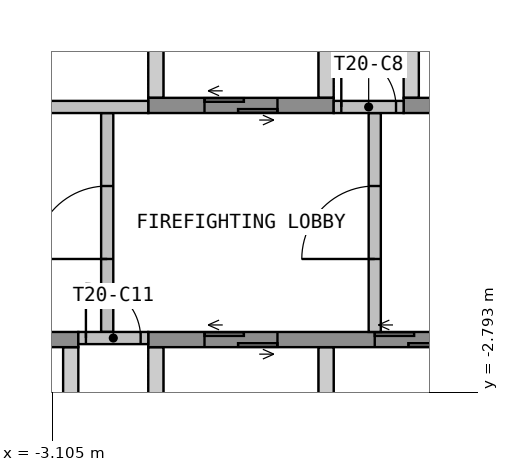
"""IFC4 building model, lengths in metres.
Left out: names, types, materials, properties, quantities, classifications, styles, units other than length and angle.
Written with IfcOpenShell. Run it as: python <this file> out.ifc"""

import sys

from ifc_helpers import new_model, si_unit, direction, frame, frame_2d, origin, place, context, subcontext, project, spatial, polyline, rectangle, outline, extrude, element, fill, save


model = new_model("IFC4")
c1 = context("Model", 3, precision=1e-05, world=origin(), true_north=direction((0.0, 1.0)))
c2 = subcontext(c1, "Body", "Model", "MODEL_VIEW")
j1 = project(units=[si_unit("LENGTHUNIT", "METRE"), si_unit("PLANEANGLEUNIT", "RADIAN")], contexts=[c1])
p1 = place(None, origin())
s1 = spatial("IfcSite", under=j1, at=p1, CompositionType="ELEMENT")
p2 = place(p1, origin())
s2 = spatial("IfcBuilding", under=s1, at=p2, CompositionType="ELEMENT")
p3 = place(p2, frame((0.0, 0.0, 270.3)))
s3 = spatial("IfcBuildingStorey", under=s2, at=p3, CompositionType="ELEMENT", Elevation=270.3)
p4 = place(p3, origin())
e1 = element("IfcWall", 1, at=p4, inside=s3, PredefinedType="SHEAR", context=c2, shape_type="SweptSolid", body=[
    extrude(outline(polyline([(-1.525, 2.05), (-1.275, 2.05), (-1.275, 4.75), (-1.525, 4.75), (-1.525, 2.05)])), origin(), (0.0, 0.0, 1.0), 3.575),
])
p5 = place(p3, origin())
e2 = element("IfcWall", 2, at=p5, inside=s3, PredefinedType="SHEAR", context=c2, shape_type="SweptSolid", body=[
    extrude(outline(polyline([(1.275, 2.05), (1.525, 2.05), (1.525, 4.75), (1.275, 4.75), (1.275, 2.05)])), origin(), (0.0, 0.0, 1.0), 3.575),
])
p6 = place(p3, origin())
e3 = element("IfcWall", 3, at=p6, inside=s3, PredefinedType="SHEAR", context=c2, shape_type="SweptSolid", body=[
    extrude(outline(polyline([(2.675, 2.05), (2.925, 2.05), (2.925, 4.75), (2.675, 4.75), (2.675, 2.05)])), origin(), (0.0, 0.0, 1.0), 3.575),
])
p7 = place(p3, frame((-1.525, 1.925, 0.0), z_axis=(0.0, 0.0, 1.0), x_axis=(1.0, 0.0, 0.0)))
e4 = element("IfcWall", 4, at=p7, inside=s3, PredefinedType="SHEAR", context=c2, shape_type="SweptSolid", body=[
    extrude(rectangle(XDim=3.05, YDim=0.25, at=frame_2d((1.525, 0.0))), origin(), (0.0, 0.0, 1.0), 3.575),
])
p8 = place(p7, frame((0.925, 0.0, 0.0)))
e5 = element("IfcOpeningElement", 5, at=p8, cuts=e4, PredefinedType="OPENING", context=c2, shape_type="SweptSolid", body=[
    extrude(rectangle(XDim=1.2, YDim=2.1, at=frame_2d((0.6, 1.05))), frame((0.0, 0.135, 0.0), z_axis=(0.0, -1.0, 0.0), x_axis=(1.0, 0.0, 0.0)), (0.0, 0.0, 1.0), 0.27),
])
p9 = place(p3, frame((2.675, 1.925, 0.0), z_axis=(0.0, 0.0, 1.0), x_axis=(1.0, 0.0, 0.0)))
e6 = element("IfcWall", 6, at=p9, inside=s3, PredefinedType="SHEAR", context=c2, shape_type="SweptSolid", body=[
    extrude(rectangle(XDim=5.85, YDim=0.25, at=frame_2d((2.925, 0.0))), origin(), (0.0, 0.0, 1.0), 3.575),
])
p10 = place(p9, frame((0.925, 0.0, 0.0)))
e7 = element("IfcOpeningElement", 7, at=p10, cuts=e6, PredefinedType="OPENING", context=c2, shape_type="SweptSolid", body=[
    extrude(rectangle(XDim=1.2, YDim=2.1, at=frame_2d((0.6, 1.05))), frame((0.0, 0.135, 0.0), z_axis=(0.0, -1.0, 0.0), x_axis=(1.0, 0.0, 0.0)), (0.0, 0.0, 1.0), 0.27),
])
p11 = place(p9, frame((3.725, 0.0, 0.0)))
e8 = element("IfcOpeningElement", 8, at=p11, cuts=e6, PredefinedType="OPENING", context=c2, shape_type="SweptSolid", body=[
    extrude(rectangle(XDim=1.2, YDim=2.1, at=frame_2d((0.6, 1.05))), frame((0.0, 0.135, 0.0), z_axis=(0.0, -1.0, 0.0), x_axis=(1.0, 0.0, 0.0)), (0.0, 0.0, 1.0), 0.27),
])
p12 = place(p3, origin())
e9 = element("IfcWall", 9, at=p12, inside=s3, PredefinedType="SHEAR", context=c2, shape_type="SweptSolid", body=[
    extrude(outline(polyline([(-2.925, -4.75), (-2.675, -4.75), (-2.675, -2.05), (-2.925, -2.05), (-2.925, -4.75)])), origin(), (0.0, 0.0, 1.0), 3.575),
])
p13 = place(p3, origin())
e10 = element("IfcWall", 10, at=p13, inside=s3, PredefinedType="SHEAR", context=c2, shape_type="SweptSolid", body=[
    extrude(outline(polyline([(-1.525, -4.75), (-1.275, -4.75), (-1.275, -2.05), (-1.525, -2.05), (-1.525, -4.75)])), origin(), (0.0, 0.0, 1.0), 3.575),
])
p14 = place(p3, origin())
e11 = element("IfcWall", 11, at=p14, inside=s3, PredefinedType="SHEAR", context=c2, shape_type="SweptSolid", body=[
    extrude(outline(polyline([(1.275, -4.75), (1.525, -4.75), (1.525, -2.05), (1.275, -2.05), (1.275, -4.75)])), origin(), (0.0, 0.0, 1.0), 3.575),
])
p15 = place(p3, frame((-11.325, -1.925, 0.0), z_axis=(0.0, 0.0, 1.0), x_axis=(1.0, 0.0, 0.0)))
e12 = element("IfcWall", 12, at=p15, inside=s3, PredefinedType="SHEAR", context=c2, shape_type="SweptSolid", body=[
    extrude(rectangle(XDim=8.65, YDim=0.25, at=frame_2d((4.325, 0.0))), origin(), (0.0, 0.0, 1.0), 3.575),
])
p16 = place(p15, frame((0.925, 0.0, 0.0)))
e13 = element("IfcOpeningElement", 13, at=p16, cuts=e12, PredefinedType="OPENING", context=c2, shape_type="SweptSolid", body=[
    extrude(rectangle(XDim=1.2, YDim=2.1, at=frame_2d((0.6, 1.05))), frame((0.0, 0.135, 0.0), z_axis=(0.0, -1.0, 0.0), x_axis=(1.0, 0.0, 0.0)), (0.0, 0.0, 1.0), 0.27),
])
p17 = place(p15, frame((3.725, 0.0, 0.0)))
e14 = element("IfcOpeningElement", 14, at=p17, cuts=e12, PredefinedType="OPENING", context=c2, shape_type="SweptSolid", body=[
    extrude(rectangle(XDim=1.2, YDim=2.1, at=frame_2d((0.6, 1.05))), frame((0.0, 0.135, 0.0), z_axis=(0.0, -1.0, 0.0), x_axis=(1.0, 0.0, 0.0)), (0.0, 0.0, 1.0), 0.27),
])
p18 = place(p15, frame((6.525, 0.0, 0.0)))
e15 = element("IfcOpeningElement", 15, at=p18, cuts=e12, PredefinedType="OPENING", context=c2, shape_type="SweptSolid", body=[
    extrude(rectangle(XDim=1.2, YDim=2.1, at=frame_2d((0.6, 1.05))), frame((0.0, 0.135, 0.0), z_axis=(0.0, -1.0, 0.0), x_axis=(1.0, 0.0, 0.0)), (0.0, 0.0, 1.0), 0.27),
])
p19 = place(p3, frame((-1.525, -1.925, 0.0), z_axis=(0.0, 0.0, 1.0), x_axis=(1.0, 0.0, 0.0)))
e16 = element("IfcWall", 16, at=p19, inside=s3, PredefinedType="SHEAR", context=c2, shape_type="SweptSolid", body=[
    extrude(rectangle(XDim=5.85, YDim=0.25, at=frame_2d((2.925, 0.0))), origin(), (0.0, 0.0, 1.0), 3.575),
])
p20 = place(p19, frame((0.925, 0.0, 0.0)))
e17 = element("IfcOpeningElement", 17, at=p20, cuts=e16, PredefinedType="OPENING", context=c2, shape_type="SweptSolid", body=[
    extrude(rectangle(XDim=1.2, YDim=2.1, at=frame_2d((0.6, 1.05))), frame((0.0, 0.135, 0.0), z_axis=(0.0, -1.0, 0.0), x_axis=(1.0, 0.0, 0.0)), (0.0, 0.0, 1.0), 0.27),
])
p21 = place(p19, frame((3.725, 0.0, 0.0)))
e18 = element("IfcOpeningElement", 18, at=p21, cuts=e16, PredefinedType="OPENING", context=c2, shape_type="SweptSolid", body=[
    extrude(rectangle(XDim=1.2, YDim=2.1, at=frame_2d((0.6, 1.05))), frame((0.0, 0.135, 0.0), z_axis=(0.0, -1.0, 0.0), x_axis=(1.0, 0.0, 0.0)), (0.0, 0.0, 1.0), 0.27),
])
p22 = place(p3, frame((-2.2, -1.8, 0.0), z_axis=(0.0, 0.0, 1.0), x_axis=(0.0, 1.0, 0.0)))
e19 = element("IfcWall", 19, at=p22, inside=s3, PredefinedType="PARTITIONING", context=c2, shape_type="SweptSolid", body=[
    extrude(rectangle(XDim=3.6, YDim=0.2, at=frame_2d((1.8, 0.0))), origin(), (0.0, 0.0, 1.0), 3.575),
])
p23 = place(p22, frame((1.2, 0.0, 0.0)))
e20 = element("IfcOpeningElement", 20, at=p23, cuts=e19, PredefinedType="OPENING", context=c2, shape_type="SweptSolid", body=[
    extrude(rectangle(XDim=1.2, YDim=2.1, at=frame_2d((0.6, 1.05))), frame((0.0, 0.11, 0.0), z_axis=(0.0, -1.0, 0.0), x_axis=(1.0, 0.0, 0.0)), (0.0, 0.0, 1.0), 0.22),
])
p24 = place(p3, frame((2.2, -1.8, 0.0), z_axis=(0.0, 0.0, 1.0), x_axis=(0.0, 1.0, 0.0)))
e21 = element("IfcWall", 21, at=p24, inside=s3, PredefinedType="PARTITIONING", context=c2, shape_type="SweptSolid", body=[
    extrude(rectangle(XDim=3.6, YDim=0.2, at=frame_2d((1.8, 0.0))), origin(), (0.0, 0.0, 1.0), 3.575),
])
p25 = place(p24, frame((1.2, 0.0, 0.0)))
e22 = element("IfcOpeningElement", 22, at=p25, cuts=e21, PredefinedType="OPENING", context=c2, shape_type="SweptSolid", body=[
    extrude(rectangle(XDim=1.2, YDim=2.1, at=frame_2d((0.6, 1.05))), frame((0.0, 0.11, 0.0), z_axis=(0.0, -1.0, 0.0), x_axis=(1.0, 0.0, 0.0)), (0.0, 0.0, 1.0), 0.22),
])
p26 = place(p3, frame((-12.9, 1.9, 0.0), z_axis=(0.0, 0.0, 1.0), x_axis=(1.0, 0.0, 0.0)))
e23 = element("IfcWall", 23, at=p26, inside=s3, PredefinedType="PARTITIONING", context=c2, shape_type="SweptSolid", body=[
    extrude(rectangle(XDim=11.375, YDim=0.2, at=frame_2d((5.688, 0.0))), origin(), (0.0, 0.0, 1.0), 3.575),
])
p27 = place(p26, frame((2.244, 0.0, 0.0)))
e24 = element("IfcOpeningElement", 24, at=p27, cuts=e23, PredefinedType="OPENING", context=c2, shape_type="SweptSolid", body=[
    extrude(rectangle(XDim=1.2, YDim=2.1, at=frame_2d((0.6, 1.05))), frame((0.0, 0.11, 0.0), z_axis=(0.0, -1.0, 0.0), x_axis=(1.0, 0.0, 0.0)), (0.0, 0.0, 1.0), 0.22),
])
p28 = place(p26, frame((7.931, 0.0, 0.0)))
e25 = element("IfcOpeningElement", 25, at=p28, cuts=e23, PredefinedType="OPENING", context=c2, shape_type="SweptSolid", body=[
    extrude(rectangle(XDim=1.2, YDim=2.1, at=frame_2d((0.6, 1.05))), frame((0.0, 0.11, 0.0), z_axis=(0.0, -1.0, 0.0), x_axis=(1.0, 0.0, 0.0)), (0.0, 0.0, 1.0), 0.22),
])
p29 = place(p3, frame((1.525, 1.9, 0.0), z_axis=(0.0, 0.0, 1.0), x_axis=(1.0, 0.0, 0.0)))
e26 = element("IfcWall", 26, at=p29, inside=s3, PredefinedType="PARTITIONING", context=c2, shape_type="SweptSolid", body=[
    extrude(rectangle(XDim=1.15, YDim=0.2, at=frame_2d((0.575, 0.0))), origin(), (0.0, 0.0, 1.0), 3.575),
])
p30 = place(p29, frame((0.125, 0.0, 0.0)))
e27 = element("IfcOpeningElement", 27, at=p30, cuts=e26, PredefinedType="OPENING", context=c2, shape_type="SweptSolid", body=[
    extrude(rectangle(XDim=0.9, YDim=2.1, at=frame_2d((0.45, 1.05))), frame((0.0, 0.11, 0.0), z_axis=(0.0, -1.0, 0.0), x_axis=(1.0, 0.0, 0.0)), (0.0, 0.0, 1.0), 0.22),
])
p31 = place(p3, frame((-2.675, -1.9, 0.0), z_axis=(0.0, 0.0, 1.0), x_axis=(1.0, 0.0, 0.0)))
e28 = element("IfcWall", 28, at=p31, inside=s3, PredefinedType="PARTITIONING", context=c2, shape_type="SweptSolid", body=[
    extrude(rectangle(XDim=1.15, YDim=0.2, at=frame_2d((0.575, 0.0))), origin(), (0.0, 0.0, 1.0), 3.575),
])
p32 = place(p31, frame((0.125, 0.0, 0.0)))
e29 = element("IfcOpeningElement", 29, at=p32, cuts=e28, PredefinedType="OPENING", context=c2, shape_type="SweptSolid", body=[
    extrude(rectangle(XDim=0.9, YDim=2.1, at=frame_2d((0.45, 1.05))), frame((0.0, 0.11, 0.0), z_axis=(0.0, -1.0, 0.0), x_axis=(1.0, 0.0, 0.0)), (0.0, 0.0, 1.0), 0.22),
])
p33 = place(p8, origin())
e30 = element("IfcDoor", 30, at=p33, inside=s3, OperationType="DOUBLE_DOOR_SLIDING", PredefinedType="DOOR", context=c2, shape_type="SweptSolid", body=[
    extrude(rectangle(XDim=1.2, YDim=2.1, at=frame_2d((0.6, 1.05))), frame((0.0, 0.025, 0.0), z_axis=(0.0, -1.0, 0.0), x_axis=(1.0, 0.0, 0.0)), (0.0, 0.0, 1.0), 0.05),
])
fill(e5, e30)
p34 = place(p20, origin())
e31 = element("IfcDoor", 31, at=p34, inside=s3, OperationType="DOUBLE_DOOR_SLIDING", PredefinedType="DOOR", context=c2, shape_type="SweptSolid", body=[
    extrude(rectangle(XDim=1.2, YDim=2.1, at=frame_2d((0.6, 1.05))), frame((0.0, 0.025, 0.0), z_axis=(0.0, -1.0, 0.0), x_axis=(1.0, 0.0, 0.0)), (0.0, 0.0, 1.0), 0.05),
])
fill(e17, e31)
p35 = place(p21, origin())
e32 = element("IfcDoor", 32, at=p35, inside=s3, OperationType="DOUBLE_DOOR_SLIDING", PredefinedType="DOOR", context=c2, shape_type="SweptSolid", body=[
    extrude(rectangle(XDim=1.2, YDim=2.1, at=frame_2d((0.6, 1.05))), frame((0.0, 0.025, 0.0), z_axis=(0.0, -1.0, 0.0), x_axis=(1.0, 0.0, 0.0)), (0.0, 0.0, 1.0), 0.05),
])
fill(e18, e32)
p36 = place(p23, origin())
e33 = element("IfcDoor", 33, at=p36, inside=s3, OperationType="SINGLE_SWING_LEFT", PredefinedType="DOOR", context=c2, shape_type="SweptSolid", body=[
    extrude(rectangle(XDim=1.2, YDim=2.1, at=frame_2d((0.6, 1.05))), frame((0.0, 0.025, 0.0), z_axis=(0.0, -1.0, 0.0), x_axis=(1.0, 0.0, 0.0)), (0.0, 0.0, 1.0), 0.05),
])
fill(e20, e33)
p37 = place(p25, origin())
e34 = element("IfcDoor", 34, at=p37, inside=s3, OperationType="SINGLE_SWING_LEFT", PredefinedType="DOOR", context=c2, shape_type="SweptSolid", body=[
    extrude(rectangle(XDim=1.2, YDim=2.1, at=frame_2d((0.6, 1.05))), frame((0.0, 0.025, 0.0), z_axis=(0.0, -1.0, 0.0), x_axis=(1.0, 0.0, 0.0)), (0.0, 0.0, 1.0), 0.05),
])
fill(e22, e34)
p38 = place(p30, origin())
e35 = element("IfcDoor", 35, at=p38, inside=s3, OperationType="SINGLE_SWING_LEFT", PredefinedType="DOOR", context=c2, shape_type="SweptSolid", body=[
    extrude(rectangle(XDim=0.9, YDim=2.1, at=frame_2d((0.45, 1.05))), frame((0.0, 0.025, 0.0), z_axis=(0.0, -1.0, 0.0), x_axis=(1.0, 0.0, 0.0)), (0.0, 0.0, 1.0), 0.05),
])
fill(e27, e35)
p39 = place(p32, origin())
e36 = element("IfcDoor", 36, at=p39, inside=s3, OperationType="SINGLE_SWING_LEFT", PredefinedType="DOOR", context=c2, shape_type="SweptSolid", body=[
    extrude(rectangle(XDim=0.9, YDim=2.1, at=frame_2d((0.45, 1.05))), frame((0.0, 0.025, 0.0), z_axis=(0.0, -1.0, 0.0), x_axis=(1.0, 0.0, 0.0)), (0.0, 0.0, 1.0), 0.05),
])
fill(e29, e36)
save(model, sys.argv[1])
